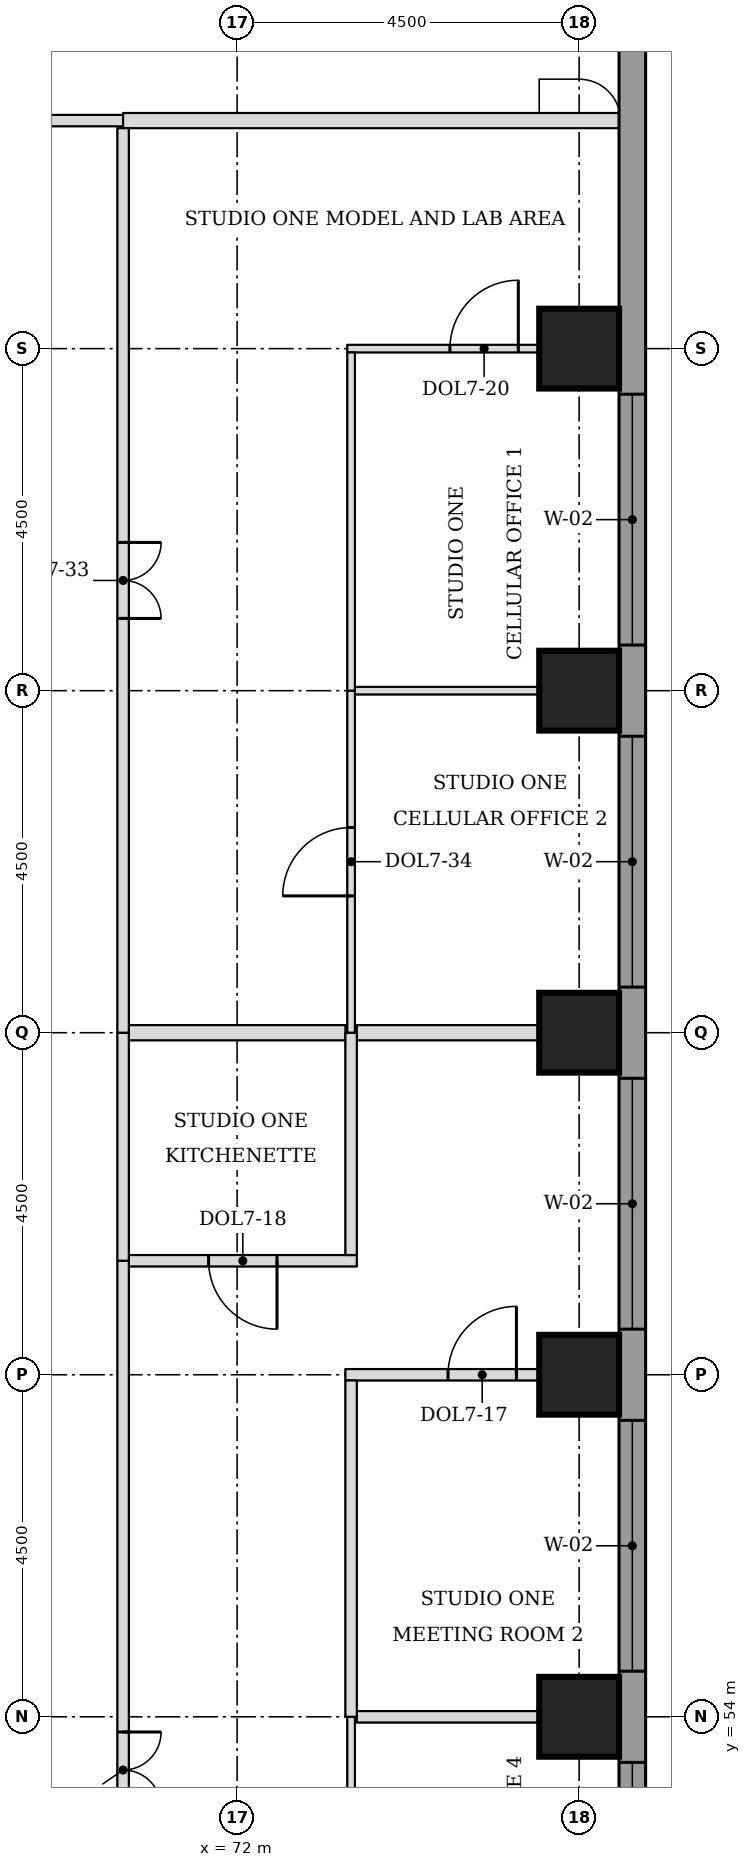
"""IFC4 building model, lengths in metres.
Left out: names, types, materials, properties, quantities, classifications, styles, units other than length and angle.
Written with IfcOpenShell. Run it as: python <this file> out.ifc"""

import sys

from ifc_helpers import new_model, si_unit, direction, frame, frame_2d, origin, origin_2d, place, context, subcontext, project, spatial, rectangle, extrude, element, fill, save


model = new_model("IFC4")
c1 = context("Model", 3, precision=1e-05, world=origin(), true_north=direction((0.0, 1.0)))
c2 = subcontext(c1, "Body", "Model", "MODEL_VIEW")
j1 = project(units=[si_unit("LENGTHUNIT", "METRE"), si_unit("PLANEANGLEUNIT", "RADIAN")], contexts=[c1])
p1 = place(None, origin())
s1 = spatial("IfcSite", under=j1, at=p1, CompositionType="ELEMENT")
p2 = place(p1, origin())
s2 = spatial("IfcBuilding", under=s1, at=p2, CompositionType="ELEMENT")
p3 = place(p2, frame((0.0, 0.0, 134.4)))
s3 = spatial("IfcBuildingStorey", under=s2, at=p3, CompositionType="ELEMENT", Elevation=134.4)
for number, where, z_axis, x_axis in (
    (1, (76.5, 54.0, 0.0), (0.0, 0.0, 1.0), (1.0, 0.0, 0.0)),
    (2, (76.5, 58.5, 0.0), (0.0, 0.0, 1.0), (1.0, 0.0, 0.0)),
    (3, (76.5, 63.0, 0.0), (0.0, 0.0, 1.0), (1.0, 0.0, 0.0)),
    (4, (76.5, 67.5, 0.0), (0.0, 0.0, 1.0), (1.0, 0.0, 0.0)),
    (5, (76.5, 72.0, 0.0), (0.0, 0.0, 1.0), (1.0, 0.0, 0.0)),
):
    element("IfcColumn", number, at=place(p3, frame(where, z_axis=z_axis, x_axis=x_axis)), inside=s3, PredefinedType="COLUMN", context=c2, shape_type="SweptSolid", body=[
        extrude(rectangle(XDim=1.05, YDim=1.05, at=origin_2d()), origin(), (0.0, 0.0, 1.0), 3.7),
    ])
p4 = place(p3, frame((77.2, 44.638, 0.0), z_axis=(0.0, 0.0, 1.0), x_axis=(0.0, 1.0, 0.0)))
e6 = element("IfcWall", 6, at=p4, inside=s3, PredefinedType="STANDARD", context=c2, shape_type="SweptSolid", body=[
    extrude(rectangle(XDim=32.225, YDim=0.35, at=frame_2d((16.112, 0.0))), origin(), (0.0, 0.0, 1.0), 3.525),
])
p5 = place(p4, frame((5.462, 0.0, 0.9)))
e7 = element("IfcOpeningElement", 7, at=p5, cuts=e6, PredefinedType="OPENING", context=c2, shape_type="SweptSolid", body=[
    extrude(rectangle(XDim=3.3, YDim=1.9, at=frame_2d((1.65, 0.95))), frame((0.0, 0.185, 0.0), z_axis=(0.0, -1.0, 0.0), x_axis=(1.0, 0.0, 0.0)), (0.0, 0.0, 1.0), 0.37),
])
p6 = place(p4, frame((9.962, 0.0, 0.9)))
e8 = element("IfcOpeningElement", 8, at=p6, cuts=e6, PredefinedType="OPENING", context=c2, shape_type="SweptSolid", body=[
    extrude(rectangle(XDim=3.3, YDim=1.9, at=frame_2d((1.65, 0.95))), frame((0.0, 0.185, 0.0), z_axis=(0.0, -1.0, 0.0), x_axis=(1.0, 0.0, 0.0)), (0.0, 0.0, 1.0), 0.37),
])
p7 = place(p4, frame((14.462, 0.0, 0.9)))
e9 = element("IfcOpeningElement", 9, at=p7, cuts=e6, PredefinedType="OPENING", context=c2, shape_type="SweptSolid", body=[
    extrude(rectangle(XDim=3.3, YDim=1.9, at=frame_2d((1.65, 0.95))), frame((0.0, 0.185, 0.0), z_axis=(0.0, -1.0, 0.0), x_axis=(1.0, 0.0, 0.0)), (0.0, 0.0, 1.0), 0.37),
])
p8 = place(p4, frame((18.962, 0.0, 0.9)))
e10 = element("IfcOpeningElement", 10, at=p8, cuts=e6, PredefinedType="OPENING", context=c2, shape_type="SweptSolid", body=[
    extrude(rectangle(XDim=3.3, YDim=1.9, at=frame_2d((1.65, 0.95))), frame((0.0, 0.185, 0.0), z_axis=(0.0, -1.0, 0.0), x_axis=(1.0, 0.0, 0.0)), (0.0, 0.0, 1.0), 0.37),
])
p9 = place(p4, frame((23.462, 0.0, 0.9)))
e11 = element("IfcOpeningElement", 11, at=p9, cuts=e6, PredefinedType="OPENING", context=c2, shape_type="SweptSolid", body=[
    extrude(rectangle(XDim=3.3, YDim=1.9, at=frame_2d((1.65, 0.95))), frame((0.0, 0.185, 0.0), z_axis=(0.0, -1.0, 0.0), x_axis=(1.0, 0.0, 0.0)), (0.0, 0.0, 1.0), 0.37),
])
p10 = place(p3, frame((73.575, 54.0, 0.0), z_axis=(0.0, 0.0, 1.0), x_axis=(1.0, 0.0, 0.0)))
e12 = element("IfcWall", 12, at=p10, inside=s3, PredefinedType="PARTITIONING", context=c2, shape_type="SweptSolid", body=[
    extrude(rectangle(XDim=3.45, YDim=0.15, at=frame_2d((1.725, 0.0))), origin(), (0.0, 0.0, 1.0), 3.55),
])
p11 = place(p3, frame((73.425, 58.5, 0.0), z_axis=(0.0, 0.0, 1.0), x_axis=(1.0, 0.0, 0.0)))
e13 = element("IfcWall", 13, at=p11, inside=s3, PredefinedType="PARTITIONING", context=c2, shape_type="SweptSolid", body=[
    extrude(rectangle(XDim=3.6, YDim=0.15, at=frame_2d((1.8, 0.0))), origin(), (0.0, 0.0, 1.0), 3.55),
])
p12 = place(p11, frame((1.35, 0.0, 0.0)))
e14 = element("IfcOpeningElement", 14, at=p12, cuts=e13, PredefinedType="OPENING", context=c2, shape_type="SweptSolid", body=[
    extrude(rectangle(XDim=0.9, YDim=2.1, at=frame_2d((0.45, 1.05))), frame((0.0, 0.085, 0.0), z_axis=(0.0, -1.0, 0.0), x_axis=(1.0, 0.0, 0.0)), (0.0, 0.0, 1.0), 0.17),
])
p13 = place(p3, frame((70.575, 60.0, 0.0), z_axis=(0.0, 0.0, 1.0), x_axis=(1.0, 0.0, 0.0)))
e15 = element("IfcWall", 15, at=p13, inside=s3, PredefinedType="PARTITIONING", context=c2, shape_type="SweptSolid", body=[
    extrude(rectangle(XDim=3.0, YDim=0.15, at=frame_2d((1.5, 0.0))), origin(), (0.0, 0.0, 1.0), 3.55),
])
p14 = place(p13, frame((1.05, 0.0, 0.0)))
e16 = element("IfcOpeningElement", 16, at=p14, cuts=e15, PredefinedType="OPENING", context=c2, shape_type="SweptSolid", body=[
    extrude(rectangle(XDim=0.9, YDim=2.1, at=frame_2d((0.45, 1.05))), frame((0.0, 0.085, 0.0), z_axis=(0.0, -1.0, 0.0), x_axis=(1.0, 0.0, 0.0)), (0.0, 0.0, 1.0), 0.17),
])
p15 = place(p3, frame((70.575, 63.0, 0.0), z_axis=(0.0, 0.0, 1.0), x_axis=(1.0, 0.0, 0.0)))
e17 = element("IfcWall", 17, at=p15, inside=s3, PredefinedType="PARTITIONING", context=c2, shape_type="SweptSolid", body=[
    extrude(rectangle(XDim=2.85, YDim=0.2, at=frame_2d((1.425, 0.0))), origin(), (0.0, 0.0, 1.0), 3.55),
])
p16 = place(p3, frame((73.575, 63.0, 0.0), z_axis=(0.0, 0.0, 1.0), x_axis=(1.0, 0.0, 0.0)))
e18 = element("IfcWall", 18, at=p16, inside=s3, PredefinedType="PARTITIONING", context=c2, shape_type="SweptSolid", body=[
    extrude(rectangle(XDim=3.45, YDim=0.2, at=frame_2d((1.725, 0.0))), origin(), (0.0, 0.0, 1.0), 3.55),
])
p17 = place(p3, frame((73.55, 67.5, 0.0), z_axis=(0.0, 0.0, 1.0), x_axis=(1.0, 0.0, 0.0)))
e19 = element("IfcWall", 19, at=p17, inside=s3, PredefinedType="PARTITIONING", context=c2, shape_type="SweptSolid", body=[
    extrude(rectangle(XDim=3.475, YDim=0.1, at=frame_2d((1.737, 0.0))), origin(), (0.0, 0.0, 1.0), 3.55),
])
p18 = place(p3, frame((73.45, 72.0, 0.0), z_axis=(0.0, 0.0, 1.0), x_axis=(1.0, 0.0, 0.0)))
e20 = element("IfcWall", 20, at=p18, inside=s3, PredefinedType="PARTITIONING", context=c2, shape_type="SweptSolid", body=[
    extrude(rectangle(XDim=3.575, YDim=0.1, at=frame_2d((1.788, 0.0))), origin(), (0.0, 0.0, 1.0), 3.55),
])
p19 = place(p18, frame((1.35, 0.0, 0.0)))
e21 = element("IfcOpeningElement", 21, at=p19, cuts=e20, PredefinedType="OPENING", context=c2, shape_type="SweptSolid", body=[
    extrude(rectangle(XDim=0.9, YDim=2.1, at=frame_2d((0.45, 1.05))), frame((0.0, 0.06, 0.0), z_axis=(0.0, -1.0, 0.0), x_axis=(1.0, 0.0, 0.0)), (0.0, 0.0, 1.0), 0.12),
])
p20 = place(p3, frame((58.5, 75.0, 0.0), z_axis=(0.0, 0.0, 1.0), x_axis=(1.0, 0.0, 0.0)))
e22 = element("IfcWall", 22, at=p20, inside=s3, PredefinedType="PARTITIONING", context=c2, shape_type="SweptSolid", body=[
    extrude(rectangle(XDim=12.0, YDim=0.15, at=frame_2d((6.0, 0.0))), origin(), (0.0, 0.0, 1.0), 3.55),
])
p21 = place(p20, frame((5.5, 0.0, 0.0)))
e23 = element("IfcOpeningElement", 23, at=p21, cuts=e22, PredefinedType="OPENING", context=c2, shape_type="SweptSolid", body=[
    extrude(rectangle(XDim=1.0, YDim=2.1, at=frame_2d((0.5, 1.05))), frame((0.0, 0.085, 0.0), z_axis=(0.0, -1.0, 0.0), x_axis=(1.0, 0.0, 0.0)), (0.0, 0.0, 1.0), 0.17),
])
p22 = place(p3, frame((70.5, 75.0, 0.0), z_axis=(0.0, 0.0, 1.0), x_axis=(1.0, 0.0, 0.0)))
e24 = element("IfcWall", 24, at=p22, inside=s3, PredefinedType="PARTITIONING", context=c2, shape_type="SweptSolid", body=[
    extrude(rectangle(XDim=6.525, YDim=0.2, at=frame_2d((3.262, 0.0))), origin(), (0.0, 0.0, 1.0), 3.55),
])
p23 = place(p3, frame((70.5, 46.6, 0.0), z_axis=(0.0, 0.0, 1.0), x_axis=(0.0, 1.0, 0.0)))
e25 = element("IfcWall", 25, at=p23, inside=s3, PredefinedType="PARTITIONING", context=c2, shape_type="SweptSolid", body=[
    extrude(rectangle(XDim=13.4, YDim=0.15, at=frame_2d((6.7, 0.0))), origin(), (0.0, 0.0, 1.0), 3.55),
])
p24 = place(p23, frame((6.2, 0.0, 0.0)))
e26 = element("IfcOpeningElement", 26, at=p24, cuts=e25, PredefinedType="OPENING", context=c2, shape_type="SweptSolid", body=[
    extrude(rectangle(XDim=1.0, YDim=2.1, at=frame_2d((0.5, 1.05))), frame((0.0, 0.085, 0.0), z_axis=(0.0, -1.0, 0.0), x_axis=(1.0, 0.0, 0.0)), (0.0, 0.0, 1.0), 0.17),
])
p25 = place(p3, frame((73.5, 49.55, 0.0), z_axis=(0.0, 0.0, 1.0), x_axis=(0.0, 1.0, 0.0)))
e27 = element("IfcWall", 27, at=p25, inside=s3, PredefinedType="PARTITIONING", context=c2, shape_type="SweptSolid", body=[
    extrude(rectangle(XDim=4.45, YDim=0.1, at=frame_2d((2.225, 0.0))), origin(), (0.0, 0.0, 1.0), 3.55),
])
p26 = place(p3, frame((73.5, 54.0, 0.0), z_axis=(0.0, 0.0, 1.0), x_axis=(0.0, 1.0, 0.0)))
e28 = element("IfcWall", 28, at=p26, inside=s3, PredefinedType="PARTITIONING", context=c2, shape_type="SweptSolid", body=[
    extrude(rectangle(XDim=4.425, YDim=0.15, at=frame_2d((2.212, 0.0))), origin(), (0.0, 0.0, 1.0), 3.55),
])
p27 = place(p3, frame((70.5, 60.0, 0.0), z_axis=(0.0, 0.0, 1.0), x_axis=(0.0, 1.0, 0.0)))
e29 = element("IfcWall", 29, at=p27, inside=s3, PredefinedType="PARTITIONING", context=c2, shape_type="SweptSolid", body=[
    extrude(rectangle(XDim=3.0, YDim=0.15, at=frame_2d((1.5, 0.0))), origin(), (0.0, 0.0, 1.0), 3.55),
])
p28 = place(p3, frame((73.5, 60.075, 0.0), z_axis=(0.0, 0.0, 1.0), x_axis=(0.0, 1.0, 0.0)))
e30 = element("IfcWall", 30, at=p28, inside=s3, PredefinedType="PARTITIONING", context=c2, shape_type="SweptSolid", body=[
    extrude(rectangle(XDim=2.925, YDim=0.15, at=frame_2d((1.462, 0.0))), origin(), (0.0, 0.0, 1.0), 3.55),
])
p29 = place(p3, frame((70.5, 63.0, 0.0), z_axis=(0.0, 0.0, 1.0), x_axis=(0.0, 1.0, 0.0)))
e31 = element("IfcWall", 31, at=p29, inside=s3, PredefinedType="PARTITIONING", context=c2, shape_type="SweptSolid", body=[
    extrude(rectangle(XDim=11.9, YDim=0.15, at=frame_2d((5.95, 0.0))), origin(), (0.0, 0.0, 1.0), 3.55),
])
p30 = place(p29, frame((5.45, 0.0, 0.0)))
e32 = element("IfcOpeningElement", 32, at=p30, cuts=e31, PredefinedType="OPENING", context=c2, shape_type="SweptSolid", body=[
    extrude(rectangle(XDim=1.0, YDim=2.1, at=frame_2d((0.5, 1.05))), frame((0.0, 0.085, 0.0), z_axis=(0.0, -1.0, 0.0), x_axis=(1.0, 0.0, 0.0)), (0.0, 0.0, 1.0), 0.17),
])
p31 = place(p3, frame((73.5, 63.0, 0.0), z_axis=(0.0, 0.0, 1.0), x_axis=(0.0, 1.0, 0.0)))
e33 = element("IfcWall", 33, at=p31, inside=s3, PredefinedType="PARTITIONING", context=c2, shape_type="SweptSolid", body=[
    extrude(rectangle(XDim=4.5, YDim=0.1, at=frame_2d((2.25, 0.0))), origin(), (0.0, 0.0, 1.0), 3.55),
])
p32 = place(p31, frame((1.8, 0.0, 0.0)))
e34 = element("IfcOpeningElement", 34, at=p32, cuts=e33, PredefinedType="OPENING", context=c2, shape_type="SweptSolid", body=[
    extrude(rectangle(XDim=0.9, YDim=2.1, at=frame_2d((0.45, 1.05))), frame((0.0, 0.06, 0.0), z_axis=(0.0, -1.0, 0.0), x_axis=(1.0, 0.0, 0.0)), (0.0, 0.0, 1.0), 0.12),
])
p33 = place(p3, frame((73.5, 67.5, 0.0), z_axis=(0.0, 0.0, 1.0), x_axis=(0.0, 1.0, 0.0)))
e35 = element("IfcWall", 35, at=p33, inside=s3, PredefinedType="PARTITIONING", context=c2, shape_type="SweptSolid", body=[
    extrude(rectangle(XDim=4.45, YDim=0.1, at=frame_2d((2.225, 0.0))), origin(), (0.0, 0.0, 1.0), 3.55),
])
p34 = place(p5, origin())
e36 = element("IfcWindow", 36, at=p34, inside=s3, PartitioningType="SINGLE_PANEL", PredefinedType="WINDOW", context=c2, shape_type="SweptSolid", body=[
    extrude(rectangle(XDim=3.3, YDim=1.9, at=frame_2d((1.65, 0.95))), frame((0.0, 0.085, 0.0), z_axis=(0.0, -1.0, 0.0), x_axis=(1.0, 0.0, 0.0)), (0.0, 0.0, 1.0), 0.06),
])
fill(e7, e36)
p35 = place(p6, origin())
e37 = element("IfcWindow", 37, at=p35, inside=s3, PartitioningType="SINGLE_PANEL", PredefinedType="WINDOW", context=c2, shape_type="SweptSolid", body=[
    extrude(rectangle(XDim=3.3, YDim=1.9, at=frame_2d((1.65, 0.95))), frame((0.0, 0.085, 0.0), z_axis=(0.0, -1.0, 0.0), x_axis=(1.0, 0.0, 0.0)), (0.0, 0.0, 1.0), 0.06),
])
fill(e8, e37)
p36 = place(p7, origin())
e38 = element("IfcWindow", 38, at=p36, inside=s3, PartitioningType="SINGLE_PANEL", PredefinedType="WINDOW", context=c2, shape_type="SweptSolid", body=[
    extrude(rectangle(XDim=3.3, YDim=1.9, at=frame_2d((1.65, 0.95))), frame((0.0, 0.085, 0.0), z_axis=(0.0, -1.0, 0.0), x_axis=(1.0, 0.0, 0.0)), (0.0, 0.0, 1.0), 0.06),
])
fill(e9, e38)
p37 = place(p8, origin())
e39 = element("IfcWindow", 39, at=p37, inside=s3, PartitioningType="SINGLE_PANEL", PredefinedType="WINDOW", context=c2, shape_type="SweptSolid", body=[
    extrude(rectangle(XDim=3.3, YDim=1.9, at=frame_2d((1.65, 0.95))), frame((0.0, 0.085, 0.0), z_axis=(0.0, -1.0, 0.0), x_axis=(1.0, 0.0, 0.0)), (0.0, 0.0, 1.0), 0.06),
])
fill(e10, e39)
p38 = place(p9, origin())
e40 = element("IfcWindow", 40, at=p38, inside=s3, PartitioningType="SINGLE_PANEL", PredefinedType="WINDOW", context=c2, shape_type="SweptSolid", body=[
    extrude(rectangle(XDim=3.3, YDim=1.9, at=frame_2d((1.65, 0.95))), frame((0.0, 0.085, 0.0), z_axis=(0.0, -1.0, 0.0), x_axis=(1.0, 0.0, 0.0)), (0.0, 0.0, 1.0), 0.06),
])
fill(e11, e40)
p39 = place(p24, frame((1.0, 0.0, 0.0), z_axis=(0.0, 0.0, 1.0), x_axis=(-1.0, 0.0, 0.0)))
e41 = element("IfcDoor", 41, at=p39, inside=s3, OperationType="DOUBLE_DOOR_SINGLE_SWING", PredefinedType="DOOR", context=c2, shape_type="SweptSolid", body=[
    extrude(rectangle(XDim=1.0, YDim=2.1, at=frame_2d((0.5, 1.05))), frame((0.0, 0.025, 0.0), z_axis=(0.0, -1.0, 0.0), x_axis=(1.0, 0.0, 0.0)), (0.0, 0.0, 1.0), 0.05),
])
fill(e26, e41)
p40 = place(p14, frame((0.9, 0.0, 0.0), z_axis=(0.0, 0.0, 1.0), x_axis=(-1.0, 0.0, 0.0)))
e42 = element("IfcDoor", 42, at=p40, inside=s3, OperationType="SINGLE_SWING_LEFT", PredefinedType="DOOR", context=c2, shape_type="SweptSolid", body=[
    extrude(rectangle(XDim=0.9, YDim=2.1, at=frame_2d((0.45, 1.05))), frame((0.0, 0.025, 0.0), z_axis=(0.0, -1.0, 0.0), x_axis=(1.0, 0.0, 0.0)), (0.0, 0.0, 1.0), 0.05),
])
fill(e16, e42)
p41 = place(p12, origin())
e43 = element("IfcDoor", 43, at=p41, inside=s3, OperationType="SINGLE_SWING_RIGHT", PredefinedType="DOOR", context=c2, shape_type="SweptSolid", body=[
    extrude(rectangle(XDim=0.9, YDim=2.1, at=frame_2d((0.45, 1.05))), frame((0.0, 0.025, 0.0), z_axis=(0.0, -1.0, 0.0), x_axis=(1.0, 0.0, 0.0)), (0.0, 0.0, 1.0), 0.05),
])
fill(e14, e43)
p42 = place(p30, frame((1.0, 0.0, 0.0), z_axis=(0.0, 0.0, 1.0), x_axis=(-1.0, 0.0, 0.0)))
e44 = element("IfcDoor", 44, at=p42, inside=s3, OperationType="DOUBLE_DOOR_SINGLE_SWING", PredefinedType="DOOR", context=c2, shape_type="SweptSolid", body=[
    extrude(rectangle(XDim=1.0, YDim=2.1, at=frame_2d((0.5, 1.05))), frame((0.0, 0.025, 0.0), z_axis=(0.0, -1.0, 0.0), x_axis=(1.0, 0.0, 0.0)), (0.0, 0.0, 1.0), 0.05),
])
fill(e32, e44)
p43 = place(p32, origin())
e45 = element("IfcDoor", 45, at=p43, inside=s3, OperationType="SINGLE_SWING_LEFT", PredefinedType="DOOR", context=c2, shape_type="SweptSolid", body=[
    extrude(rectangle(XDim=0.9, YDim=2.1, at=frame_2d((0.45, 1.05))), frame((0.0, 0.025, 0.0), z_axis=(0.0, -1.0, 0.0), x_axis=(1.0, 0.0, 0.0)), (0.0, 0.0, 1.0), 0.05),
])
fill(e34, e45)
p44 = place(p19, origin())
e46 = element("IfcDoor", 46, at=p44, inside=s3, OperationType="SINGLE_SWING_RIGHT", PredefinedType="DOOR", context=c2, shape_type="SweptSolid", body=[
    extrude(rectangle(XDim=0.9, YDim=2.1, at=frame_2d((0.45, 1.05))), frame((0.0, 0.025, 0.0), z_axis=(0.0, -1.0, 0.0), x_axis=(1.0, 0.0, 0.0)), (0.0, 0.0, 1.0), 0.05),
])
fill(e21, e46)
save(model, sys.argv[1])
